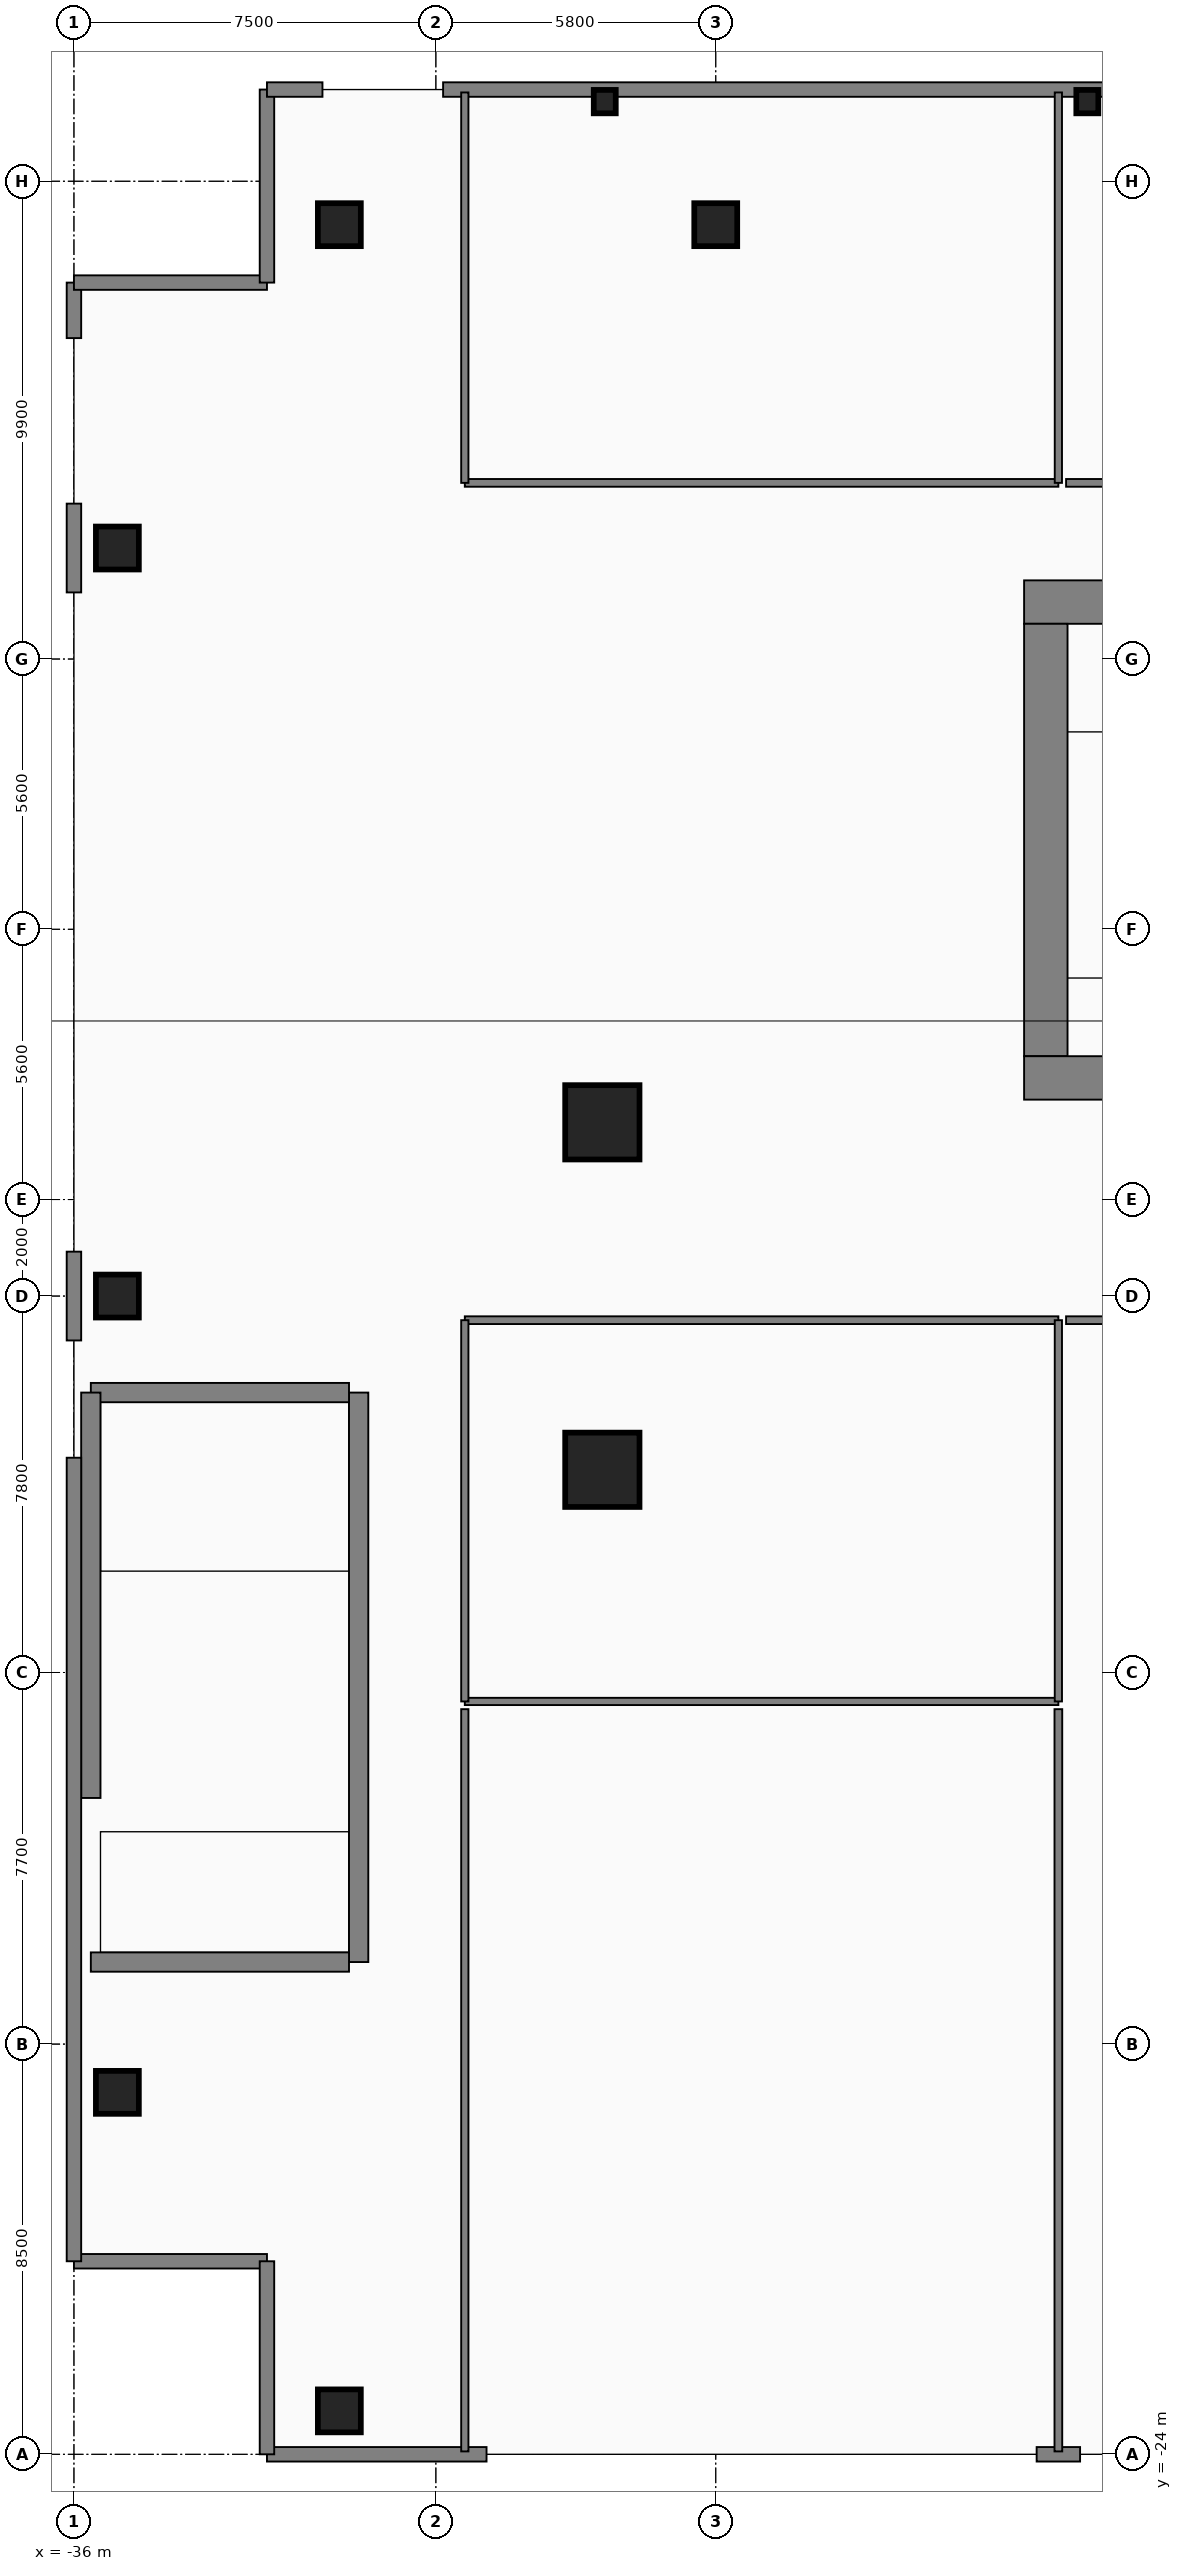
"""IFC4 building model, lengths in metres.
Left out: names, types, materials, properties, quantities, classifications, styles, units other than length and angle.
Written with IfcOpenShell. Run it as: python <this file> out.ifc"""

import sys

from ifc_helpers import new_model, si_unit, direction, frame, frame_2d, origin, origin_2d, place, context, subcontext, project, spatial, rectangle, i_section, extrude, element, fill, save


model = new_model("IFC4")
c1 = context("Model", 3, precision=1e-05, world=origin(), true_north=direction((0.0, 1.0)))
c2 = subcontext(c1, "Body", "Model", "MODEL_VIEW")
j1 = project(units=[si_unit("LENGTHUNIT", "METRE"), si_unit("PLANEANGLEUNIT", "RADIAN")], contexts=[c1])
p1 = place(None, origin())
s1 = spatial("IfcSite", under=j1, at=p1, CompositionType="ELEMENT")
p2 = place(p1, origin())
s2 = spatial("IfcBuilding", under=s1, at=p2, CompositionType="ELEMENT")
p3 = place(p2, origin())
s3 = spatial("IfcBuildingStorey", under=s2, at=p3, CompositionType="ELEMENT", Elevation=0.0)
p4 = place(p3, frame((-16.31, 14.38, 0.0), z_axis=(0.0, 0.0, 1.0), x_axis=(1.0, 0.0, 0.0)))
e1 = element("IfcWall", 1, at=p4, inside=s3, PredefinedType="SHEAR", context=c2, shape_type="SweptSolid", body=[
    extrude(rectangle(XDim=4.71, YDim=0.9, at=frame_2d((2.355, 0.0))), origin(), (0.0, 0.0, 1.0), 5.81),
])
p5 = place(p3, frame((-15.86, 4.97, 0.0), z_axis=(0.0, 0.0, 1.0), x_axis=(0.0, 1.0, 0.0)))
e2 = element("IfcWall", 2, at=p5, inside=s3, PredefinedType="SHEAR", context=c2, shape_type="SweptSolid", body=[
    extrude(rectangle(XDim=8.96, YDim=0.9, at=frame_2d((4.48, 0.0))), origin(), (0.0, 0.0, 1.0), 5.81),
])
p6 = place(p3, frame((-16.31, 4.52, 0.0), z_axis=(0.0, 0.0, 1.0), x_axis=(1.0, 0.0, 0.0)))
e3 = element("IfcWall", 3, at=p6, inside=s3, PredefinedType="SHEAR", context=c2, shape_type="SweptSolid", body=[
    extrude(rectangle(XDim=4.71, YDim=0.9, at=frame_2d((2.355, 0.0))), origin(), (0.0, 0.0, 1.0), 5.81),
])
p7 = place(p3, frame((-30.1, -13.8, 0.0), z_axis=(0.0, 0.0, 1.0), x_axis=(0.0, 1.0, 0.0)))
e4 = element("IfcWall", 4, at=p7, inside=s3, PredefinedType="SHEAR", context=c2, shape_type="SweptSolid", body=[
    extrude(rectangle(XDim=11.8, YDim=0.4, at=frame_2d((5.9, 0.0))), origin(), (0.0, 0.0, 1.0), 5.81),
])
p8 = place(p7, frame((0.45, 0.0, 0.0)))
e5 = element("IfcOpeningElement", 5, at=p8, cuts=e4, PredefinedType="OPENING", context=c2, shape_type="SweptSolid", body=[
    extrude(rectangle(XDim=1.12, YDim=2.22, at=frame_2d((0.56, 1.11))), frame((0.0, 0.21, 0.0), z_axis=(0.0, -1.0, 0.0), x_axis=(1.0, 0.0, 0.0)), (0.0, 0.0, 1.0), 0.42),
])
for number, where, z_axis, x_axis in (
    (6, (-35.65, -13.8, 0.0), (0.0, 0.0, 1.0), (1.0, 0.0, 0.0)),
    (7, (-35.65, -2.0, 0.0), (0.0, 0.0, 1.0), (1.0, 0.0, 0.0)),
):
    element("IfcWall", number, at=place(p3, frame(where, z_axis=z_axis, x_axis=x_axis)), inside=s3, PredefinedType="SHEAR", context=c2, shape_type="SweptSolid", body=[
        extrude(rectangle(XDim=5.35, YDim=0.4, at=frame_2d((2.675, 0.0))), origin(), (0.0, 0.0, 1.0), 5.81),
    ])
p9 = place(p3, frame((-35.65, -10.4, 0.0), z_axis=(0.0, 0.0, 1.0), x_axis=(0.0, 1.0, 0.0)))
e8 = element("IfcWall", 8, at=p9, inside=s3, PredefinedType="SHEAR", context=c2, shape_type="SweptSolid", body=[
    extrude(rectangle(XDim=8.4, YDim=0.4, at=frame_2d((4.2, 0.0))), origin(), (0.0, 0.0, 1.0), 5.81),
])
for number, where, z_axis, x_axis in (
    (9, (-25.05, -3.6, 0.0), (0.0, 0.0, 1.0), (1.0, 0.0, 0.0)),
    (10, (-25.05, 3.6, 0.0), (0.0, 0.0, 1.0), (1.0, 0.0, 0.0)),
):
    element("IfcColumn", number, at=place(p3, frame(where, z_axis=z_axis, x_axis=x_axis)), inside=s3, PredefinedType="COLUMN", context=c2, shape_type="SweptSolid", body=[
        extrude(rectangle(XDim=1.5, YDim=1.5, at=origin_2d()), origin(), (0.0, 0.0, 1.0), 6.0),
    ])
for number, where, z_axis, x_axis in (
    (11, (-30.5, -23.1, 0.0), (0.0, 0.0, 1.0), (1.0, 0.0, 0.0)),
    (12, (-30.5, 22.2, 0.0), (0.0, 0.0, 1.0), (1.0, 0.0, 0.0)),
    (13, (-35.1, -16.5, 0.0), (0.0, 0.0, 1.0), (1.0, 0.0, 0.0)),
    (14, (-35.1, 0.0, 0.0), (0.0, 0.0, 1.0), (1.0, 0.0, 0.0)),
    (15, (-35.1, 15.5, 0.0), (0.0, 0.0, 1.0), (1.0, 0.0, 0.0)),
    (16, (-22.7, 22.2, 0.0), (0.0, 0.0, 1.0), (1.0, 0.0, 0.0)),
):
    element("IfcColumn", number, at=place(p3, frame(where, z_axis=z_axis, x_axis=x_axis)), inside=s3, PredefinedType="COLUMN", context=c2, shape_type="SweptSolid", body=[
        extrude(rectangle(XDim=0.85, YDim=0.85, at=origin_2d()), origin(), (0.0, 0.0, 1.0), 6.0),
    ])
for number, where, z_axis, x_axis in (
    (17, (-25.0, 24.75, -0.27), (0.0, 0.0, 1.0), (1.0, 0.0, 0.0)),
    (18, (-15.0, 24.75, -0.27), (0.0, 0.0, 1.0), (1.0, 0.0, 0.0)),
):
    element("IfcColumn", number, at=place(p3, frame(where, z_axis=z_axis, x_axis=x_axis)), inside=s3, PredefinedType="PILASTER", context=c2, shape_type="SweptSolid", body=[
        extrude(i_section(OverallWidth=0.416, OverallDepth=0.445, WebThickness=0.039, FlangeThickness=0.063, at=origin_2d()), origin(), (0.0, 0.0, 1.0), 6.02),
    ])
p10 = place(p3, frame((-32.0, -20.0, 0.0), z_axis=(0.0, 0.0, 1.0), x_axis=(-1.0, 0.0, 0.0)))
e19 = element("IfcWall", 19, at=p10, inside=s3, PredefinedType="STANDARD", context=c2, shape_type="SweptSolid", body=[
    extrude(rectangle(XDim=4.0, YDim=0.3, at=frame_2d((2.0, 0.0))), origin(), (0.0, 0.0, 1.0), 5.75),
])
p11 = place(p3, frame((-36.0, -20.0, 0.0), z_axis=(0.0, 0.0, 1.0), x_axis=(0.0, 1.0, 0.0)))
e20 = element("IfcWall", 20, at=p11, inside=s3, PredefinedType="STANDARD", context=c2, shape_type="SweptSolid", body=[
    extrude(rectangle(XDim=16.65, YDim=0.3, at=frame_2d((8.325, 0.0))), origin(), (0.0, 0.0, 1.0), 5.75),
])
p12 = place(p11, frame((6.8, 0.0, 0.0)))
e21 = element("IfcOpeningElement", 21, at=p12, cuts=e20, PredefinedType="OPENING", context=c2, shape_type="SweptSolid", body=[
    extrude(rectangle(XDim=1.8, YDim=2.4, at=frame_2d((0.9, 1.2))), frame((0.0, 0.16, 0.0), z_axis=(0.0, -1.0, 0.0), x_axis=(1.0, 0.0, 0.0)), (0.0, 0.0, 1.0), 0.32),
])
p13 = place(p11, frame((1.1, 0.0, 0.0)))
e22 = element("IfcOpeningElement", 22, at=p13, cuts=e20, PredefinedType="OPENING", context=c2, shape_type="SweptSolid", body=[
    extrude(rectangle(XDim=3.6, YDim=3.4, at=frame_2d((1.8, 1.7))), frame((0.0, 0.16, 0.0), z_axis=(0.0, -1.0, 0.0), x_axis=(1.0, 0.0, 0.0)), (0.0, 0.0, 1.0), 0.32),
])
for number, where, z_axis, x_axis in (
    (23, (-36.0, -0.92, 0.0), (0.0, 0.0, 1.0), (0.0, 1.0, 0.0)),
    (24, (-36.0, 14.58, 0.0), (0.0, 0.0, 1.0), (0.0, 1.0, 0.0)),
):
    element("IfcWall", number, at=place(p3, frame(where, z_axis=z_axis, x_axis=x_axis)), inside=s3, PredefinedType="STANDARD", context=c2, shape_type="SweptSolid", body=[
        extrude(rectangle(XDim=1.84, YDim=0.3, at=frame_2d((0.92, 0.0))), origin(), (0.0, 0.0, 1.0), 5.75),
    ])
p14 = place(p3, frame((-36.0, 19.85, 0.0), z_axis=(0.0, 0.0, 1.0), x_axis=(0.0, 1.0, 0.0)))
e25 = element("IfcWall", 25, at=p14, inside=s3, PredefinedType="STANDARD", context=c2, shape_type="SweptSolid", body=[
    extrude(rectangle(XDim=1.15, YDim=0.3, at=frame_2d((0.575, 0.0))), origin(), (0.0, 0.0, 1.0), 5.75),
])
for number, where, z_axis, x_axis in (
    (26, (-36.0, 21.0, 0.0), (0.0, 0.0, 1.0), (1.0, 0.0, 0.0)),
    (27, (-32.0, 21.0, 0.0), (0.0, 0.0, 1.0), (0.0, 1.0, 0.0)),
):
    element("IfcWall", number, at=place(p3, frame(where, z_axis=z_axis, x_axis=x_axis)), inside=s3, PredefinedType="STANDARD", context=c2, shape_type="SweptSolid", body=[
        extrude(rectangle(XDim=4.0, YDim=0.3, at=frame_2d((2.0, 0.0))), origin(), (0.0, 0.0, 1.0), 5.75),
    ])
p15 = place(p3, frame((-32.0, 25.0, 0.0), z_axis=(0.0, 0.0, 1.0), x_axis=(1.0, 0.0, 0.0)))
e28 = element("IfcWall", 28, at=p15, inside=s3, PredefinedType="STANDARD", context=c2, shape_type="SweptSolid", body=[
    extrude(rectangle(XDim=1.15, YDim=0.3, at=frame_2d((0.575, 0.0))), origin(), (0.0, 0.0, 1.0), 5.75),
])
p16 = place(p3, frame((-28.35, 25.0, 0.0), z_axis=(0.0, 0.0, 1.0), x_axis=(1.0, 0.0, 0.0)))
e29 = element("IfcWall", 29, at=p16, inside=s3, PredefinedType="STANDARD", context=c2, shape_type="SweptSolid", body=[
    extrude(rectangle(XDim=14.27, YDim=0.3, at=frame_2d((7.135, 0.0))), origin(), (0.0, 0.0, 1.0), 5.75),
])
p17 = place(p16, frame((7.35, 0.0, 0.0)))
e30 = element("IfcOpeningElement", 30, at=p17, cuts=e29, PredefinedType="OPENING", context=c2, shape_type="SweptSolid", body=[
    extrude(rectangle(XDim=2.4, YDim=2.45, at=frame_2d((1.2, 1.225))), frame((0.0, 0.16, 0.0), z_axis=(0.0, -1.0, 0.0), x_axis=(1.0, 0.0, 0.0)), (0.0, 0.0, 1.0), 0.32),
])
p18 = place(p16, frame((4.25, 0.0, 0.9)))
e31 = element("IfcOpeningElement", 31, at=p18, cuts=e29, PredefinedType="OPENING", context=c2, shape_type="SweptSolid", body=[
    extrude(rectangle(XDim=2.4, YDim=2.2, at=frame_2d((1.2, 1.1))), frame((0.0, 0.16, 0.0), z_axis=(0.0, -1.0, 0.0), x_axis=(1.0, 0.0, 0.0)), (0.0, 0.0, 1.0), 0.32),
])
p19 = place(p3, frame((-15.15, -24.0, 0.0), z_axis=(0.0, 0.0, 1.0), x_axis=(-1.0, 0.0, 0.0)))
e32 = element("IfcWall", 32, at=p19, inside=s3, PredefinedType="STANDARD", context=c2, shape_type="SweptSolid", body=[
    extrude(rectangle(XDim=0.9, YDim=0.3, at=frame_2d((0.45, 0.0))), origin(), (0.0, 0.0, 1.0), 5.75),
])
p20 = place(p3, frame((-27.45, -24.0, 0.0), z_axis=(0.0, 0.0, 1.0), x_axis=(-1.0, 0.0, 0.0)))
e33 = element("IfcWall", 33, at=p20, inside=s3, PredefinedType="STANDARD", context=c2, shape_type="SweptSolid", body=[
    extrude(rectangle(XDim=4.55, YDim=0.3, at=frame_2d((2.275, 0.0))), origin(), (0.0, 0.0, 1.0), 5.75),
])
p21 = place(p3, frame((-32.0, -24.0, 0.0), z_axis=(0.0, 0.0, 1.0), x_axis=(0.0, 1.0, 0.0)))
e34 = element("IfcWall", 34, at=p21, inside=s3, PredefinedType="STANDARD", context=c2, shape_type="SweptSolid", body=[
    extrude(rectangle(XDim=4.0, YDim=0.3, at=frame_2d((2.0, 0.0))), origin(), (0.0, 0.0, 1.0), 5.75),
])
p22 = place(p3, frame((-27.9, 16.85, 0.0), z_axis=(0.0, 0.0, 1.0), x_axis=(1.0, 0.0, 0.0)))
e35 = element("IfcWall", 35, at=p22, inside=s3, PredefinedType="PARTITIONING", context=c2, shape_type="SweptSolid", body=[
    extrude(rectangle(XDim=12.3, YDim=0.16, at=frame_2d((6.15, 0.0))), origin(), (0.0, 0.0, 1.0), 5.75),
])
p23 = place(p22, frame((7.01, 0.0, 0.0)))
e36 = element("IfcOpeningElement", 36, at=p23, cuts=e35, PredefinedType="OPENING", context=c2, shape_type="SweptSolid", body=[
    extrude(rectangle(XDim=1.08, YDim=2.18, at=frame_2d((0.54, 1.09))), frame((0.0, 0.09, 0.0), z_axis=(0.0, -1.0, 0.0), x_axis=(1.0, 0.0, 0.0)), (0.0, 0.0, 1.0), 0.18),
])
p24 = place(p3, frame((-15.44, 16.85, 0.0), z_axis=(0.0, 0.0, 1.0), x_axis=(1.0, 0.0, 0.0)))
e37 = element("IfcWall", 37, at=p24, inside=s3, PredefinedType="PARTITIONING", context=c2, shape_type="SweptSolid", body=[
    extrude(rectangle(XDim=30.88, YDim=0.16, at=frame_2d((15.44, 0.0))), origin(), (0.0, 0.0, 1.0), 5.217),
])
p25 = place(p24, frame((14.9, 0.0, 0.0)))
e38 = element("IfcOpeningElement", 38, at=p25, cuts=e37, PredefinedType="OPENING", context=c2, shape_type="SweptSolid", body=[
    extrude(rectangle(XDim=1.08, YDim=2.18, at=frame_2d((0.54, 1.09))), frame((0.0, 0.09, 0.0), z_axis=(0.0, -1.0, 0.0), x_axis=(1.0, 0.0, 0.0)), (0.0, 0.0, 1.0), 0.18),
])
p26 = place(p3, frame((-27.9, -0.5, 0.0), z_axis=(0.0, 0.0, 1.0), x_axis=(1.0, 0.0, 0.0)))
e39 = element("IfcWall", 39, at=p26, inside=s3, PredefinedType="PARTITIONING", context=c2, shape_type="SweptSolid", body=[
    extrude(rectangle(XDim=12.3, YDim=0.16, at=frame_2d((6.15, 0.0))), origin(), (0.0, 0.0, 1.0), 5.75),
])
p27 = place(p26, frame((7.01, 0.0, 0.0)))
e40 = element("IfcOpeningElement", 40, at=p27, cuts=e39, PredefinedType="OPENING", context=c2, shape_type="SweptSolid", body=[
    extrude(rectangle(XDim=1.08, YDim=2.18, at=frame_2d((0.54, 1.09))), frame((0.0, 0.09, 0.0), z_axis=(0.0, -1.0, 0.0), x_axis=(1.0, 0.0, 0.0)), (0.0, 0.0, 1.0), 0.18),
])
p28 = place(p3, frame((-15.6, -23.94, 0.0), z_axis=(0.0, 0.0, 1.0), x_axis=(0.0, 1.0, 0.0)))
e41 = element("IfcWall", 41, at=p28, inside=s3, PredefinedType="PARTITIONING", context=c2, shape_type="SweptSolid", body=[
    extrude(rectangle(XDim=15.38, YDim=0.16, at=frame_2d((7.69, 0.0))), origin(), (0.0, 0.0, 1.0), 5.75),
])
p29 = place(p28, frame((7.15, 0.0, 0.0)))
e42 = element("IfcOpeningElement", 42, at=p29, cuts=e41, PredefinedType="OPENING", context=c2, shape_type="SweptSolid", body=[
    extrude(rectangle(XDim=1.08, YDim=2.18, at=frame_2d((0.54, 1.09))), frame((0.0, 0.09, 0.0), z_axis=(0.0, -1.0, 0.0), x_axis=(1.0, 0.0, 0.0)), (0.0, 0.0, 1.0), 0.18),
])
p30 = place(p3, frame((-15.44, -0.5, 0.0), z_axis=(0.0, 0.0, 1.0), x_axis=(1.0, 0.0, 0.0)))
e43 = element("IfcWall", 43, at=p30, inside=s3, PredefinedType="PARTITIONING", context=c2, shape_type="SweptSolid", body=[
    extrude(rectangle(XDim=23.08, YDim=0.16, at=frame_2d((11.54, 0.0))), origin(), (0.0, 0.0, 1.0), 5.75),
])
p31 = place(p30, frame((12.65, 0.0, 0.0)))
e44 = element("IfcOpeningElement", 44, at=p31, cuts=e43, PredefinedType="OPENING", context=c2, shape_type="SweptSolid", body=[
    extrude(rectangle(XDim=1.08, YDim=2.18, at=frame_2d((0.54, 1.09))), frame((0.0, 0.09, 0.0), z_axis=(0.0, -1.0, 0.0), x_axis=(1.0, 0.0, 0.0)), (0.0, 0.0, 1.0), 0.18),
])
for number, where, z_axis, x_axis in (
    (45, (-27.9, 16.85, 0.0), (0.0, 0.0, 1.0), (0.0, 1.0, 0.0)),
    (46, (-15.6, 16.85, 0.0), (0.0, 0.0, 1.0), (0.0, 1.0, 0.0)),
):
    element("IfcWall", number, at=place(p3, frame(where, z_axis=z_axis, x_axis=x_axis)), inside=s3, PredefinedType="PARTITIONING", context=c2, shape_type="SweptSolid", body=[
        extrude(rectangle(XDim=8.09, YDim=0.15, at=frame_2d((4.045, 0.0))), origin(), (0.0, 0.0, 1.0), 5.75),
    ])
p32 = place(p3, frame((-27.9, -8.4, 0.0), z_axis=(0.0, 0.0, 1.0), x_axis=(1.0, 0.0, 0.0)))
e47 = element("IfcWall", 47, at=p32, inside=s3, PredefinedType="PARTITIONING", context=c2, shape_type="SweptSolid", body=[
    extrude(rectangle(XDim=12.3, YDim=0.15, at=frame_2d((6.15, 0.0))), origin(), (0.0, 0.0, 1.0), 5.75),
])
for number, where, z_axis, x_axis in (
    (48, (-27.9, -8.4, 0.0), (0.0, 0.0, 1.0), (0.0, 1.0, 0.0)),
    (49, (-15.6, -8.4, 0.0), (0.0, 0.0, 1.0), (0.0, 1.0, 0.0)),
):
    element("IfcWall", number, at=place(p3, frame(where, z_axis=z_axis, x_axis=x_axis)), inside=s3, PredefinedType="PARTITIONING", context=c2, shape_type="SweptSolid", body=[
        extrude(rectangle(XDim=7.9, YDim=0.15, at=frame_2d((3.95, 0.0))), origin(), (0.0, 0.0, 1.0), 5.75),
    ])
p33 = place(p3, frame((-27.9, -23.94, 0.0), z_axis=(0.0, 0.0, 1.0), x_axis=(0.0, 1.0, 0.0)))
e50 = element("IfcWall", 50, at=p33, inside=s3, PredefinedType="PARTITIONING", context=c2, shape_type="SweptSolid", body=[
    extrude(rectangle(XDim=15.38, YDim=0.15, at=frame_2d((7.69, 0.0))), origin(), (0.0, 0.0, 1.0), 5.75),
])
p34 = place(p12, origin())
e51 = element("IfcDoor", 51, at=p34, inside=s3, OperationType="DOUBLE_DOOR_SINGLE_SWING", PredefinedType="DOOR", context=c2, shape_type="SweptSolid", body=[
    extrude(rectangle(XDim=1.8, YDim=2.4, at=frame_2d((0.9, 1.2))), frame((0.0, 0.025, 0.0), z_axis=(0.0, -1.0, 0.0), x_axis=(1.0, 0.0, 0.0)), (0.0, 0.0, 1.0), 0.05),
])
fill(e21, e51)
p35 = place(p13, origin())
e52 = element("IfcDoor", 52, at=p35, inside=s3, OperationType="ROLLINGUP", PredefinedType="GATE", context=c2, shape_type="SweptSolid", body=[
    extrude(rectangle(XDim=3.6, YDim=3.4, at=frame_2d((1.8, 1.7))), frame((0.0, 0.025, 0.0), z_axis=(0.0, -1.0, 0.0), x_axis=(1.0, 0.0, 0.0)), (0.0, 0.0, 1.0), 0.05),
])
fill(e22, e52)
p36 = place(p17, origin())
e53 = element("IfcDoor", 53, at=p36, inside=s3, OperationType="DOUBLE_DOOR_SINGLE_SWING", PredefinedType="DOOR", context=c2, shape_type="SweptSolid", body=[
    extrude(rectangle(XDim=2.4, YDim=2.45, at=frame_2d((1.2, 1.225))), frame((0.0, 0.025, 0.0), z_axis=(0.0, -1.0, 0.0), x_axis=(1.0, 0.0, 0.0)), (0.0, 0.0, 1.0), 0.05),
])
fill(e30, e53)
p37 = place(p18, origin())
e54 = element("IfcWindow", 54, at=p37, inside=s3, PartitioningType="SINGLE_PANEL", PredefinedType="WINDOW", context=c2, shape_type="SweptSolid", body=[
    extrude(rectangle(XDim=2.4, YDim=2.2, at=frame_2d((1.2, 1.1))), frame((0.0, 0.03, 0.0), z_axis=(0.0, -1.0, 0.0), x_axis=(1.0, 0.0, 0.0)), (0.0, 0.0, 1.0), 0.06),
])
fill(e31, e54)
p38 = place(p8, origin())
e55 = element("IfcDoor", 55, at=p38, inside=s3, OperationType="SINGLE_SWING_RIGHT", PredefinedType="DOOR", context=c2, shape_type="SweptSolid", body=[
    extrude(rectangle(XDim=1.12, YDim=2.22, at=frame_2d((0.56, 1.11))), frame((0.0, 0.025, 0.0), z_axis=(0.0, -1.0, 0.0), x_axis=(1.0, 0.0, 0.0)), (0.0, 0.0, 1.0), 0.05),
])
fill(e5, e55)
p39 = place(p23, origin())
e56 = element("IfcDoor", 56, at=p39, inside=s3, OperationType="SINGLE_SWING_RIGHT", PredefinedType="DOOR", context=c2, shape_type="SweptSolid", body=[
    extrude(rectangle(XDim=1.08, YDim=2.18, at=frame_2d((0.54, 1.09))), frame((0.0, 0.025, 0.0), z_axis=(0.0, -1.0, 0.0), x_axis=(1.0, 0.0, 0.0)), (0.0, 0.0, 1.0), 0.05),
])
fill(e36, e56)
p40 = place(p27, origin())
e57 = element("IfcDoor", 57, at=p40, inside=s3, OperationType="SINGLE_SWING_LEFT", PredefinedType="DOOR", context=c2, shape_type="SweptSolid", body=[
    extrude(rectangle(XDim=1.08, YDim=2.18, at=frame_2d((0.54, 1.09))), frame((0.0, 0.025, 0.0), z_axis=(0.0, -1.0, 0.0), x_axis=(1.0, 0.0, 0.0)), (0.0, 0.0, 1.0), 0.05),
])
fill(e40, e57)
p41 = place(p29, origin())
e58 = element("IfcDoor", 58, at=p41, inside=s3, OperationType="SINGLE_SWING_RIGHT", PredefinedType="DOOR", context=c2, shape_type="SweptSolid", body=[
    extrude(rectangle(XDim=1.08, YDim=2.18, at=frame_2d((0.54, 1.09))), frame((0.0, 0.025, 0.0), z_axis=(0.0, -1.0, 0.0), x_axis=(1.0, 0.0, 0.0)), (0.0, 0.0, 1.0), 0.05),
])
fill(e42, e58)
save(model, sys.argv[1])
